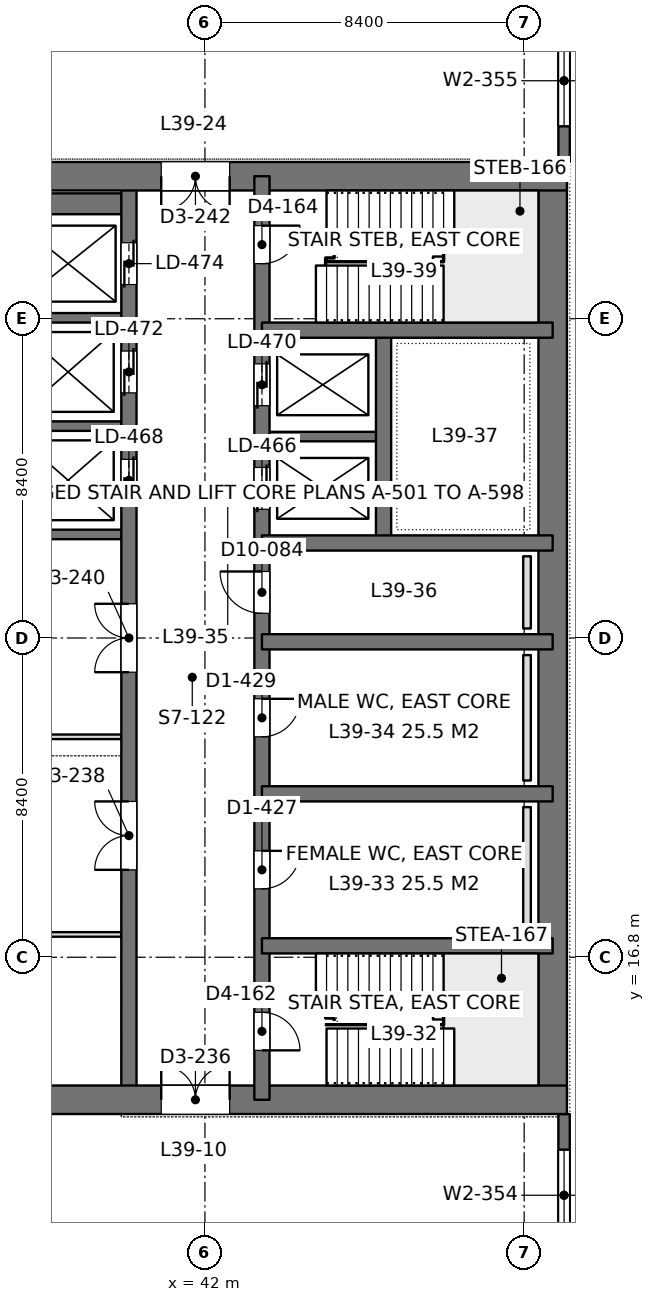
"""IFC4 building model, lengths in metres.
Left out: names, types, materials, properties, quantities, classifications, styles, units other than length and angle.
Written with IfcOpenShell. Run it as: python <this file> out.ifc"""

import sys

from ifc_helpers import new_model, si_unit, direction, frame, frame_2d, origin, place, context, subcontext, project, spatial, rectangle, extrude, element, fill, save


model = new_model("IFC4")
c1 = context("Model", 3, precision=1e-05, world=origin(), true_north=direction((0.0, 1.0)))
c2 = subcontext(c1, "Body", "Model", "MODEL_VIEW")
j1 = project(units=[si_unit("LENGTHUNIT", "METRE"), si_unit("PLANEANGLEUNIT", "RADIAN")], contexts=[c1])
p1 = place(None, origin())
s1 = spatial("IfcSite", under=j1, at=p1, CompositionType="ELEMENT")
p2 = place(p1, origin())
s2 = spatial("IfcBuilding", under=s1, at=p2, CompositionType="ELEMENT")
p3 = place(p2, frame((0.0, 0.0, 173.4)))
s3 = spatial("IfcBuildingStorey", under=s2, at=p3, CompositionType="ELEMENT", Elevation=173.4)
p4 = place(p3, frame((33.675, 13.05, 0.0), z_axis=(0.0, 0.0, 1.0), x_axis=(1.0, 0.0, 0.0)))
e1 = element("IfcWall", 1, at=p4, inside=s3, PredefinedType="SHEAR", context=c2, shape_type="SweptSolid", body=[
    extrude(rectangle(XDim=17.85, YDim=0.75, at=frame_2d((8.925, 0.0))), origin(), (0.0, 0.0, 1.0), 4.2),
])
p5 = place(p4, frame((7.175, 0.0, 0.0)))
e2 = element("IfcOpeningElement", 2, at=p5, cuts=e1, PredefinedType="OPENING", context=c2, shape_type="SweptSolid", body=[
    extrude(rectangle(XDim=1.8, YDim=2.4, at=frame_2d((0.9, 1.2))), frame((0.0, 0.385, 0.0), z_axis=(0.0, -1.0, 0.0), x_axis=(1.0, 0.0, 0.0)), (0.0, 0.0, 1.0), 0.77),
])
p6 = place(p3, frame((33.675, 37.35, 0.0), z_axis=(0.0, 0.0, 1.0), x_axis=(1.0, 0.0, 0.0)))
e3 = element("IfcWall", 3, at=p6, inside=s3, PredefinedType="SHEAR", context=c2, shape_type="SweptSolid", body=[
    extrude(rectangle(XDim=17.85, YDim=0.75, at=frame_2d((8.925, 0.0))), origin(), (0.0, 0.0, 1.0), 4.2),
])
p7 = place(p6, frame((7.175, 0.0, 0.0)))
e4 = element("IfcOpeningElement", 4, at=p7, cuts=e3, PredefinedType="OPENING", context=c2, shape_type="SweptSolid", body=[
    extrude(rectangle(XDim=1.8, YDim=2.4, at=frame_2d((0.9, 1.2))), frame((0.0, 0.385, 0.0), z_axis=(0.0, -1.0, 0.0), x_axis=(1.0, 0.0, 0.0)), (0.0, 0.0, 1.0), 0.77),
])
p8 = place(p3, frame((51.15, 13.05, 0.0), z_axis=(0.0, 0.0, 1.0), x_axis=(0.0, 1.0, 0.0)))
e5 = element("IfcWall", 5, at=p8, inside=s3, PredefinedType="SHEAR", context=c2, shape_type="SweptSolid", body=[
    extrude(rectangle(XDim=24.3, YDim=0.75, at=frame_2d((12.15, 0.0))), origin(), (0.0, 0.0, 1.0), 4.2),
])
p9 = place(p3, frame((43.5, 13.05, 0.0), z_axis=(0.0, 0.0, 1.0), x_axis=(0.0, 1.0, 0.0)))
e6 = element("IfcWall", 6, at=p9, inside=s3, PredefinedType="SHEAR", context=c2, shape_type="SweptSolid", body=[
    extrude(rectangle(XDim=24.3, YDim=0.4, at=frame_2d((12.15, 0.0))), origin(), (0.0, 0.0, 1.0), 4.2),
])
p10 = place(p9, frame((1.3, 0.0, 0.0)))
e7 = element("IfcOpeningElement", 7, at=p10, cuts=e6, PredefinedType="OPENING", context=c2, shape_type="SweptSolid", body=[
    extrude(rectangle(XDim=1.0, YDim=2.2, at=frame_2d((0.5, 1.1))), frame((0.0, 0.21, 0.0), z_axis=(0.0, -1.0, 0.0), x_axis=(1.0, 0.0, 0.0)), (0.0, 0.0, 1.0), 0.42),
])
p11 = place(p9, frame((22.0, 0.0, 0.0)))
e8 = element("IfcOpeningElement", 8, at=p11, cuts=e6, PredefinedType="OPENING", context=c2, shape_type="SweptSolid", body=[
    extrude(rectangle(XDim=1.0, YDim=2.2, at=frame_2d((0.5, 1.1))), frame((0.0, 0.21, 0.0), z_axis=(0.0, -1.0, 0.0), x_axis=(1.0, 0.0, 0.0)), (0.0, 0.0, 1.0), 0.42),
])
p12 = place(p9, frame((5.55, 0.0, 0.0)))
e9 = element("IfcOpeningElement", 9, at=p12, cuts=e6, PredefinedType="OPENING", context=c2, shape_type="SweptSolid", body=[
    extrude(rectangle(XDim=1.0, YDim=2.2, at=frame_2d((0.5, 1.1))), frame((0.0, 0.21, 0.0), z_axis=(0.0, -1.0, 0.0), x_axis=(1.0, 0.0, 0.0)), (0.0, 0.0, 1.0), 0.42),
])
p13 = place(p9, frame((9.55, 0.0, 0.0)))
e10 = element("IfcOpeningElement", 10, at=p13, cuts=e6, PredefinedType="OPENING", context=c2, shape_type="SweptSolid", body=[
    extrude(rectangle(XDim=1.0, YDim=2.2, at=frame_2d((0.5, 1.1))), frame((0.0, 0.21, 0.0), z_axis=(0.0, -1.0, 0.0), x_axis=(1.0, 0.0, 0.0)), (0.0, 0.0, 1.0), 0.42),
])
p14 = place(p9, frame((12.8, 0.0, 0.0)))
e11 = element("IfcOpeningElement", 11, at=p14, cuts=e6, PredefinedType="OPENING", context=c2, shape_type="SweptSolid", body=[
    extrude(rectangle(XDim=1.1, YDim=2.2, at=frame_2d((0.55, 1.1))), frame((0.0, 0.21, 0.0), z_axis=(0.0, -1.0, 0.0), x_axis=(1.0, 0.0, 0.0)), (0.0, 0.0, 1.0), 0.42),
])
p15 = place(p9, frame((15.538, 0.0, 0.0)))
e12 = element("IfcOpeningElement", 12, at=p15, cuts=e6, PredefinedType="OPENING", context=c2, shape_type="SweptSolid", body=[
    extrude(rectangle(XDim=1.1, YDim=2.2, at=frame_2d((0.55, 1.1))), frame((0.0, 0.21, 0.0), z_axis=(0.0, -1.0, 0.0), x_axis=(1.0, 0.0, 0.0)), (0.0, 0.0, 1.0), 0.42),
])
p16 = place(p9, frame((18.262, 0.0, 0.0)))
e13 = element("IfcOpeningElement", 13, at=p16, cuts=e6, PredefinedType="OPENING", context=c2, shape_type="SweptSolid", body=[
    extrude(rectangle(XDim=1.1, YDim=2.2, at=frame_2d((0.55, 1.1))), frame((0.0, 0.21, 0.0), z_axis=(0.0, -1.0, 0.0), x_axis=(1.0, 0.0, 0.0)), (0.0, 0.0, 1.0), 0.42),
])
p17 = place(p3, frame((40.0, 13.05, 0.0), z_axis=(0.0, 0.0, 1.0), x_axis=(0.0, 1.0, 0.0)))
e14 = element("IfcWall", 14, at=p17, inside=s3, PredefinedType="SHEAR", context=c2, shape_type="SweptSolid", body=[
    extrude(rectangle(XDim=24.3, YDim=0.4, at=frame_2d((12.15, 0.0))), origin(), (0.0, 0.0, 1.0), 4.2),
])
p18 = place(p17, frame((15.75, 0.0, 0.0)))
e15 = element("IfcOpeningElement", 15, at=p18, cuts=e14, PredefinedType="OPENING", context=c2, shape_type="SweptSolid", body=[
    extrude(rectangle(XDim=1.1, YDim=2.2, at=frame_2d((0.55, 1.1))), frame((0.0, 0.21, 0.0), z_axis=(0.0, -1.0, 0.0), x_axis=(1.0, 0.0, 0.0)), (0.0, 0.0, 1.0), 0.42),
])
p19 = place(p17, frame((18.6, 0.0, 0.0)))
e16 = element("IfcOpeningElement", 16, at=p19, cuts=e14, PredefinedType="OPENING", context=c2, shape_type="SweptSolid", body=[
    extrude(rectangle(XDim=1.1, YDim=2.2, at=frame_2d((0.55, 1.1))), frame((0.0, 0.21, 0.0), z_axis=(0.0, -1.0, 0.0), x_axis=(1.0, 0.0, 0.0)), (0.0, 0.0, 1.0), 0.42),
])
p20 = place(p17, frame((21.45, 0.0, 0.0)))
e17 = element("IfcOpeningElement", 17, at=p20, cuts=e14, PredefinedType="OPENING", context=c2, shape_type="SweptSolid", body=[
    extrude(rectangle(XDim=1.1, YDim=2.2, at=frame_2d((0.55, 1.1))), frame((0.0, 0.21, 0.0), z_axis=(0.0, -1.0, 0.0), x_axis=(1.0, 0.0, 0.0)), (0.0, 0.0, 1.0), 0.42),
])
p21 = place(p17, frame((6.05, 0.0, 0.0)))
e18 = element("IfcOpeningElement", 18, at=p21, cuts=e14, PredefinedType="OPENING", context=c2, shape_type="SweptSolid", body=[
    extrude(rectangle(XDim=1.8, YDim=2.4, at=frame_2d((0.9, 1.2))), frame((0.0, 0.21, 0.0), z_axis=(0.0, -1.0, 0.0), x_axis=(1.0, 0.0, 0.0)), (0.0, 0.0, 1.0), 0.42),
])
p22 = place(p17, frame((11.25, 0.0, 0.0)))
e19 = element("IfcOpeningElement", 19, at=p22, cuts=e14, PredefinedType="OPENING", context=c2, shape_type="SweptSolid", body=[
    extrude(rectangle(XDim=1.8, YDim=2.4, at=frame_2d((0.9, 1.2))), frame((0.0, 0.21, 0.0), z_axis=(0.0, -1.0, 0.0), x_axis=(1.0, 0.0, 0.0)), (0.0, 0.0, 1.0), 0.42),
])
for number, where, z_axis, x_axis in (
    (20, (51.15, 17.1, 0.0), (0.0, 0.0, 1.0), (-1.0, 0.0, 0.0)),
    (21, (51.15, 21.1, 0.0), (0.0, 0.0, 1.0), (-1.0, 0.0, 0.0)),
    (22, (51.15, 25.1, 0.0), (0.0, 0.0, 1.0), (-1.0, 0.0, 0.0)),
    (23, (51.15, 27.7, 0.0), (0.0, 0.0, 1.0), (-1.0, 0.0, 0.0)),
    (24, (51.15, 33.3, 0.0), (0.0, 0.0, 1.0), (-1.0, 0.0, 0.0)),
):
    element("IfcWall", number, at=place(p3, frame(where, z_axis=z_axis, x_axis=x_axis)), inside=s3, PredefinedType="SHEAR", context=c2, shape_type="SweptSolid", body=[
        extrude(rectangle(XDim=7.65, YDim=0.4, at=frame_2d((3.825, 0.0))), origin(), (0.0, 0.0, 1.0), 4.2),
    ])
p23 = place(p3, frame((46.7, 27.7, 0.0), z_axis=(0.0, 0.0, 1.0), x_axis=(0.0, 1.0, 0.0)))
e25 = element("IfcWall", 25, at=p23, inside=s3, PredefinedType="SHEAR", context=c2, shape_type="SweptSolid", body=[
    extrude(rectangle(XDim=5.6, YDim=0.4, at=frame_2d((2.8, 0.0))), origin(), (0.0, 0.0, 1.0), 4.2),
])
p24 = place(p3, frame((46.7, 30.5, 0.0), z_axis=(0.0, 0.0, 1.0), x_axis=(-1.0, 0.0, 0.0)))
e26 = element("IfcWall", 26, at=p24, inside=s3, PredefinedType="SHEAR", context=c2, shape_type="SweptSolid", body=[
    extrude(rectangle(XDim=3.2, YDim=0.25, at=frame_2d((1.6, 0.0))), origin(), (0.0, 0.0, 1.0), 4.2),
])
p25 = place(p3, frame((40.0, 27.925, 0.0), z_axis=(0.0, 0.0, 1.0), x_axis=(-1.0, 0.0, 0.0)))
e27 = element("IfcWall", 27, at=p25, inside=s3, PredefinedType="SHEAR", context=c2, shape_type="SweptSolid", body=[
    extrude(rectangle(XDim=5.95, YDim=0.25, at=frame_2d((2.975, 0.0))), origin(), (0.0, 0.0, 1.0), 4.2),
])
for number, where, z_axis, x_axis in (
    (28, (40.0, 30.775, 0.0), (0.0, 0.0, 1.0), (-1.0, 0.0, 0.0)),
    (29, (40.0, 33.625, 0.0), (0.0, 0.0, 1.0), (-1.0, 0.0, 0.0)),
):
    element("IfcWall", number, at=place(p3, frame(where, z_axis=z_axis, x_axis=x_axis)), inside=s3, PredefinedType="SHEAR", context=c2, shape_type="SweptSolid", body=[
        extrude(rectangle(XDim=3.2, YDim=0.25, at=frame_2d((1.6, 0.0))), origin(), (0.0, 0.0, 1.0), 4.2),
    ])
p26 = place(p3, frame((40.0, 36.625, 0.0), z_axis=(0.0, 0.0, 1.0), x_axis=(-1.0, 0.0, 0.0)))
e30 = element("IfcWall", 30, at=p26, inside=s3, PredefinedType="SHEAR", context=c2, shape_type="SweptSolid", body=[
    extrude(rectangle(XDim=3.2, YDim=0.55, at=frame_2d((1.6, 0.0))), origin(), (0.0, 0.0, 1.0), 4.2),
])
p27 = place(p3, frame((51.45, 42.0, 0.0), z_axis=(0.0, 0.0, 1.0), x_axis=(0.0, -1.0, 0.0)))
e31 = element("IfcWall", 31, at=p27, inside=s3, PredefinedType="SOLIDWALL", context=c2, shape_type="SweptSolid", body=[
    extrude(rectangle(XDim=4.275, YDim=0.3, at=frame_2d((2.137, 0.0))), origin(), (0.0, 0.0, 1.0), 4.05),
])
p28 = place(p27, frame((0.938, 0.0, 0.9)))
e32 = element("IfcOpeningElement", 32, at=p28, cuts=e31, PredefinedType="OPENING", context=c2, shape_type="SweptSolid", body=[
    extrude(rectangle(XDim=2.4, YDim=1.9, at=frame_2d((1.2, 0.95))), frame((0.0, 0.16, 0.0), z_axis=(0.0, -1.0, 0.0), x_axis=(1.0, 0.0, 0.0)), (0.0, 0.0, 1.0), 0.32),
])
p29 = place(p3, frame((51.45, 12.675, 0.0), z_axis=(0.0, 0.0, 1.0), x_axis=(0.0, -1.0, 0.0)))
e33 = element("IfcWall", 33, at=p29, inside=s3, PredefinedType="SOLIDWALL", context=c2, shape_type="SweptSolid", body=[
    extrude(rectangle(XDim=4.275, YDim=0.3, at=frame_2d((2.138, 0.0))), origin(), (0.0, 0.0, 1.0), 4.05),
])
p30 = place(p29, frame((0.938, 0.0, 0.9)))
e34 = element("IfcOpeningElement", 34, at=p30, cuts=e33, PredefinedType="OPENING", context=c2, shape_type="SweptSolid", body=[
    extrude(rectangle(XDim=2.4, YDim=1.9, at=frame_2d((1.2, 0.95))), frame((0.0, 0.16, 0.0), z_axis=(0.0, -1.0, 0.0), x_axis=(1.0, 0.0, 0.0)), (0.0, 0.0, 1.0), 0.32),
])
p31 = place(p3, frame((33.898, 17.4, 0.0), z_axis=(0.0, 0.0, 1.0), x_axis=(1.0, 0.0, 0.0)))
e35 = element("IfcWall", 35, at=p31, inside=s3, PredefinedType="PARTITIONING", context=c2, shape_type="SweptSolid", body=[
    extrude(rectangle(XDim=5.904, YDim=0.12, at=frame_2d((2.952, 0.0))), origin(), (0.0, 0.0, 1.0), 3.55),
])
p32 = place(p3, frame((34.749, 22.6, 0.0), z_axis=(0.0, 0.0, 1.0), x_axis=(1.0, 0.0, 0.0)))
e36 = element("IfcWall", 36, at=p32, inside=s3, PredefinedType="PARTITIONING", context=c2, shape_type="SweptSolid", body=[
    extrude(rectangle(XDim=5.053, YDim=0.12, at=frame_2d((2.526, 0.0))), origin(), (0.0, 0.0, 1.0), 4.05),
])
for number, where, z_axis, x_axis in (
    (37, (50.475, 17.45, 0.0), (0.0, 0.0, 1.0), (0.0, 1.0, 0.0)),
    (38, (50.475, 21.45, 0.0), (0.0, 0.0, 1.0), (0.0, 1.0, 0.0)),
):
    element("IfcWall", number, at=place(p3, frame(where, z_axis=z_axis, x_axis=x_axis)), inside=s3, PredefinedType="PLUMBINGWALL", context=c2, shape_type="SweptSolid", body=[
        extrude(rectangle(XDim=3.3, YDim=0.2, at=frame_2d((1.65, 0.0))), origin(), (0.0, 0.0, 1.0), 1.2),
    ])
p33 = place(p3, frame((50.475, 25.45, 0.0), z_axis=(0.0, 0.0, 1.0), x_axis=(0.0, 1.0, 0.0)))
e39 = element("IfcWall", 39, at=p33, inside=s3, PredefinedType="PLUMBINGWALL", context=c2, shape_type="SweptSolid", body=[
    extrude(rectangle(XDim=1.9, YDim=0.2, at=frame_2d((0.95, 0.0))), origin(), (0.0, 0.0, 1.0), 1.2),
])
p34 = place(p28, origin())
e40 = element("IfcWindow", 40, at=p34, inside=s3, PartitioningType="SINGLE_PANEL", PredefinedType="WINDOW", context=c2, shape_type="SweptSolid", body=[
    extrude(rectangle(XDim=2.4, YDim=1.9, at=frame_2d((1.2, 0.95))), frame((0.0, 0.03, 0.0), z_axis=(0.0, -1.0, 0.0), x_axis=(1.0, 0.0, 0.0)), (0.0, 0.0, 1.0), 0.06),
])
fill(e32, e40)
p35 = place(p30, origin())
e41 = element("IfcWindow", 41, at=p35, inside=s3, PartitioningType="SINGLE_PANEL", PredefinedType="WINDOW", context=c2, shape_type="SweptSolid", body=[
    extrude(rectangle(XDim=2.4, YDim=1.9, at=frame_2d((1.2, 0.95))), frame((0.0, 0.03, 0.0), z_axis=(0.0, -1.0, 0.0), x_axis=(1.0, 0.0, 0.0)), (0.0, 0.0, 1.0), 0.06),
])
fill(e34, e41)
p36 = place(p5, origin())
e42 = element("IfcDoor", 42, at=p36, inside=s3, OperationType="DOUBLE_DOOR_SINGLE_SWING", PredefinedType="DOOR", context=c2, shape_type="SweptSolid", body=[
    extrude(rectangle(XDim=1.8, YDim=2.4, at=frame_2d((0.9, 1.2))), frame((0.0, 0.025, 0.0), z_axis=(0.0, -1.0, 0.0), x_axis=(1.0, 0.0, 0.0)), (0.0, 0.0, 1.0), 0.05),
])
fill(e2, e42)
p37 = place(p7, frame((1.8, 0.0, 0.0), z_axis=(0.0, 0.0, 1.0), x_axis=(-1.0, 0.0, 0.0)))
e43 = element("IfcDoor", 43, at=p37, inside=s3, OperationType="DOUBLE_DOOR_SINGLE_SWING", PredefinedType="DOOR", context=c2, shape_type="SweptSolid", body=[
    extrude(rectangle(XDim=1.8, YDim=2.4, at=frame_2d((0.9, 1.2))), frame((0.0, 0.025, 0.0), z_axis=(0.0, -1.0, 0.0), x_axis=(1.0, 0.0, 0.0)), (0.0, 0.0, 1.0), 0.05),
])
fill(e4, e43)
p38 = place(p10, frame((1.0, 0.0, 0.0), z_axis=(0.0, 0.0, 1.0), x_axis=(-1.0, 0.0, 0.0)))
e44 = element("IfcDoor", 44, at=p38, inside=s3, OperationType="SINGLE_SWING_RIGHT", PredefinedType="DOOR", context=c2, shape_type="SweptSolid", body=[
    extrude(rectangle(XDim=1.0, YDim=2.2, at=frame_2d((0.5, 1.1))), frame((0.0, 0.025, 0.0), z_axis=(0.0, -1.0, 0.0), x_axis=(1.0, 0.0, 0.0)), (0.0, 0.0, 1.0), 0.05),
])
fill(e7, e44)
p39 = place(p11, frame((1.0, 0.0, 0.0), z_axis=(0.0, 0.0, 1.0), x_axis=(-1.0, 0.0, 0.0)))
e45 = element("IfcDoor", 45, at=p39, inside=s3, OperationType="SINGLE_SWING_LEFT", PredefinedType="DOOR", context=c2, shape_type="SweptSolid", body=[
    extrude(rectangle(XDim=1.0, YDim=2.2, at=frame_2d((0.5, 1.1))), frame((0.0, 0.025, 0.0), z_axis=(0.0, -1.0, 0.0), x_axis=(1.0, 0.0, 0.0)), (0.0, 0.0, 1.0), 0.05),
])
fill(e8, e45)
p40 = place(p12, frame((1.0, 0.0, 0.0), z_axis=(0.0, 0.0, 1.0), x_axis=(-1.0, 0.0, 0.0)))
e46 = element("IfcDoor", 46, at=p40, inside=s3, OperationType="SINGLE_SWING_LEFT", PredefinedType="DOOR", context=c2, shape_type="SweptSolid", body=[
    extrude(rectangle(XDim=1.0, YDim=2.2, at=frame_2d((0.5, 1.1))), frame((0.0, 0.025, 0.0), z_axis=(0.0, -1.0, 0.0), x_axis=(1.0, 0.0, 0.0)), (0.0, 0.0, 1.0), 0.05),
])
fill(e9, e46)
p41 = place(p13, frame((1.0, 0.0, 0.0), z_axis=(0.0, 0.0, 1.0), x_axis=(-1.0, 0.0, 0.0)))
e47 = element("IfcDoor", 47, at=p41, inside=s3, OperationType="SINGLE_SWING_LEFT", PredefinedType="DOOR", context=c2, shape_type="SweptSolid", body=[
    extrude(rectangle(XDim=1.0, YDim=2.2, at=frame_2d((0.5, 1.1))), frame((0.0, 0.025, 0.0), z_axis=(0.0, -1.0, 0.0), x_axis=(1.0, 0.0, 0.0)), (0.0, 0.0, 1.0), 0.05),
])
fill(e10, e47)
p42 = place(p14, origin())
e48 = element("IfcDoor", 48, at=p42, inside=s3, OperationType="SINGLE_SWING_RIGHT", PredefinedType="DOOR", context=c2, shape_type="SweptSolid", body=[
    extrude(rectangle(XDim=1.1, YDim=2.2, at=frame_2d((0.55, 1.1))), frame((0.0, 0.025, 0.0), z_axis=(0.0, -1.0, 0.0), x_axis=(1.0, 0.0, 0.0)), (0.0, 0.0, 1.0), 0.05),
])
fill(e11, e48)
p43 = place(p18, origin())
e49 = element("IfcDoor", 49, at=p43, inside=s3, OperationType="DOUBLE_DOOR_SLIDING", PredefinedType="DOOR", context=c2, shape_type="SweptSolid", body=[
    extrude(rectangle(XDim=1.1, YDim=2.2, at=frame_2d((0.55, 1.1))), frame((0.0, 0.025, 0.0), z_axis=(0.0, -1.0, 0.0), x_axis=(1.0, 0.0, 0.0)), (0.0, 0.0, 1.0), 0.05),
])
fill(e15, e49)
p44 = place(p19, origin())
e50 = element("IfcDoor", 50, at=p44, inside=s3, OperationType="DOUBLE_DOOR_SLIDING", PredefinedType="DOOR", context=c2, shape_type="SweptSolid", body=[
    extrude(rectangle(XDim=1.1, YDim=2.2, at=frame_2d((0.55, 1.1))), frame((0.0, 0.025, 0.0), z_axis=(0.0, -1.0, 0.0), x_axis=(1.0, 0.0, 0.0)), (0.0, 0.0, 1.0), 0.05),
])
fill(e16, e50)
p45 = place(p20, origin())
e51 = element("IfcDoor", 51, at=p45, inside=s3, OperationType="DOUBLE_DOOR_SLIDING", PredefinedType="DOOR", context=c2, shape_type="SweptSolid", body=[
    extrude(rectangle(XDim=1.1, YDim=2.2, at=frame_2d((0.55, 1.1))), frame((0.0, 0.025, 0.0), z_axis=(0.0, -1.0, 0.0), x_axis=(1.0, 0.0, 0.0)), (0.0, 0.0, 1.0), 0.05),
])
fill(e17, e51)
p46 = place(p15, origin())
e52 = element("IfcDoor", 52, at=p46, inside=s3, OperationType="DOUBLE_DOOR_SLIDING", PredefinedType="DOOR", context=c2, shape_type="SweptSolid", body=[
    extrude(rectangle(XDim=1.1, YDim=2.2, at=frame_2d((0.55, 1.1))), frame((0.0, 0.025, 0.0), z_axis=(0.0, -1.0, 0.0), x_axis=(1.0, 0.0, 0.0)), (0.0, 0.0, 1.0), 0.05),
])
fill(e12, e52)
p47 = place(p16, origin())
e53 = element("IfcDoor", 53, at=p47, inside=s3, OperationType="DOUBLE_DOOR_SLIDING", PredefinedType="DOOR", context=c2, shape_type="SweptSolid", body=[
    extrude(rectangle(XDim=1.1, YDim=2.2, at=frame_2d((0.55, 1.1))), frame((0.0, 0.025, 0.0), z_axis=(0.0, -1.0, 0.0), x_axis=(1.0, 0.0, 0.0)), (0.0, 0.0, 1.0), 0.05),
])
fill(e13, e53)
p48 = place(p21, origin())
e54 = element("IfcDoor", 54, at=p48, inside=s3, OperationType="DOUBLE_DOOR_SINGLE_SWING", PredefinedType="DOOR", context=c2, shape_type="SweptSolid", body=[
    extrude(rectangle(XDim=1.8, YDim=2.4, at=frame_2d((0.9, 1.2))), frame((0.0, 0.025, 0.0), z_axis=(0.0, -1.0, 0.0), x_axis=(1.0, 0.0, 0.0)), (0.0, 0.0, 1.0), 0.05),
])
fill(e18, e54)
p49 = place(p22, origin())
e55 = element("IfcDoor", 55, at=p49, inside=s3, OperationType="DOUBLE_DOOR_SINGLE_SWING", PredefinedType="DOOR", context=c2, shape_type="SweptSolid", body=[
    extrude(rectangle(XDim=1.8, YDim=2.4, at=frame_2d((0.9, 1.2))), frame((0.0, 0.025, 0.0), z_axis=(0.0, -1.0, 0.0), x_axis=(1.0, 0.0, 0.0)), (0.0, 0.0, 1.0), 0.05),
])
fill(e19, e55)
save(model, sys.argv[1])
